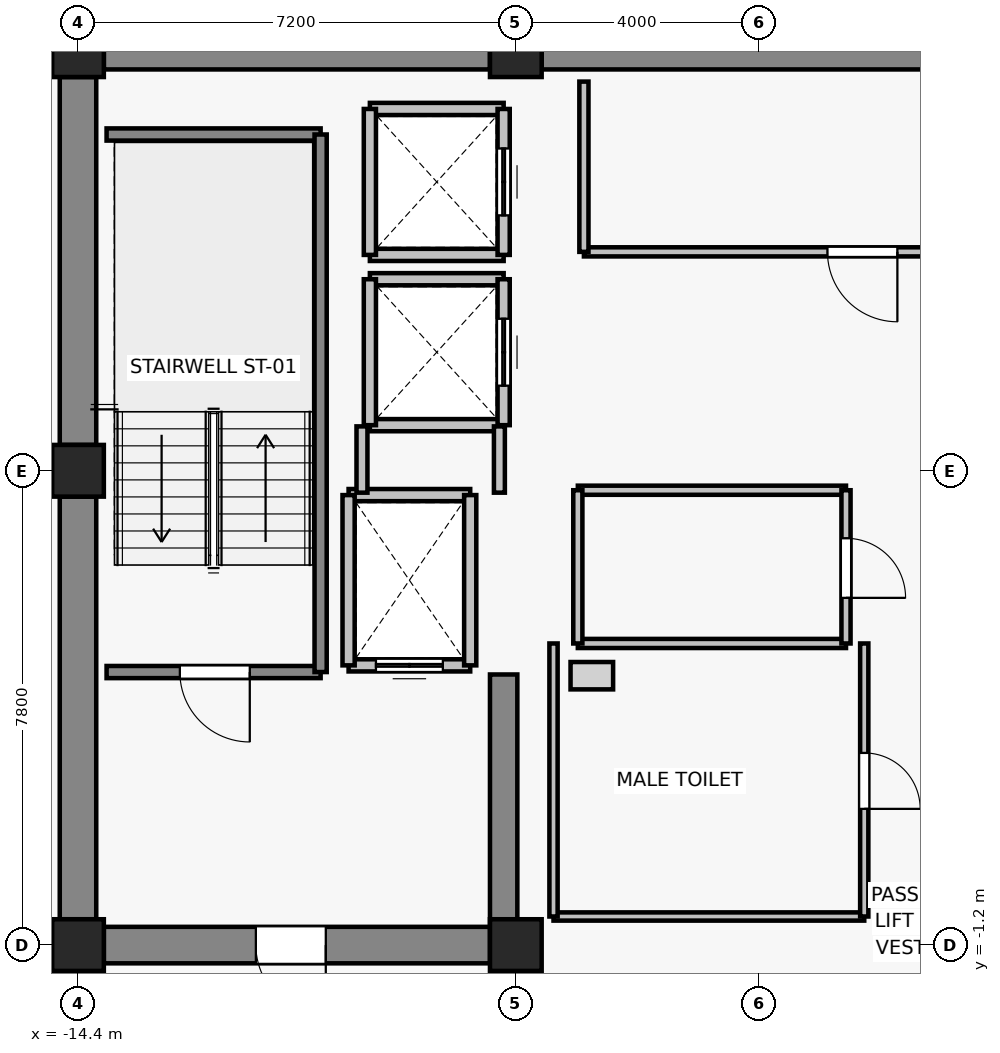
"""IFC4 building model, lengths in metres.
Left out: names, types, materials, properties, quantities, classifications, styles, units other than length and angle.
Written with IfcOpenShell. Run it as: python <this file> out.ifc"""

import sys

from ifc_helpers import new_model, si_unit, direction, frame, frame_2d, origin, origin_2d, place, context, subcontext, project, spatial, rectangle, extrude, source, transform, mapped, element, fill, save


model = new_model("IFC4")
c1 = context("Model", 3, precision=1e-05, world=origin(), true_north=direction((0.0, 1.0)))
c2 = subcontext(c1, "Body", "Model", "MODEL_VIEW")
j1 = project(units=[si_unit("LENGTHUNIT", "METRE"), si_unit("PLANEANGLEUNIT", "RADIAN")], contexts=[c1])
p1 = place(None, origin())
s1 = spatial("IfcSite", under=j1, at=p1, CompositionType="ELEMENT")
p2 = place(p1, origin())
s2 = spatial("IfcBuilding", under=s1, at=p2, CompositionType="ELEMENT")
p3 = place(p2, frame((0.0, 0.0, 238.6)))
s3 = spatial("IfcBuildingStorey", under=s2, at=p3, CompositionType="ELEMENT", Elevation=238.6)
for number, where, z_axis, x_axis in (
    (1, (-14.4, -1.2, 0.0), (0.0, 0.0, 1.0), (1.0, 0.0, 0.0)),
    (2, (-7.2, -1.2, 0.0), (0.0, 0.0, 1.0), (1.0, 0.0, 0.0)),
    (3, (-14.4, 6.6, 0.0), (0.0, 0.0, 1.0), (1.0, 0.0, 0.0)),
    (4, (-14.4, 13.5, 0.0), (0.0, 0.0, 1.0), (1.0, 0.0, 0.0)),
    (5, (-7.2, 13.5, 0.0), (0.0, 0.0, 1.0), (1.0, 0.0, 0.0)),
):
    element("IfcColumn", number, at=place(p3, frame(where, z_axis=z_axis, x_axis=x_axis)), inside=s3, PredefinedType="COLUMN", context=c2, shape_type="SweptSolid", body=[
        extrude(rectangle(XDim=0.85, YDim=0.85, at=origin_2d()), origin(), (0.0, 0.0, 1.0), 3.3),
    ])
p4 = place(p3, frame((-13.975, 13.5, 0.0), z_axis=(0.0, 0.0, 1.0), x_axis=(1.0, 0.0, 0.0)))
e6 = element("IfcWall", 6, at=p4, inside=s3, PredefinedType="SHEAR", context=c2, shape_type="SweptSolid", body=[
    extrude(rectangle(XDim=6.35, YDim=0.6, at=frame_2d((3.175, 0.0))), origin(), (0.0, 0.0, 1.0), 3.075),
])
p5 = place(p3, frame((-6.775, 13.5, 0.0), z_axis=(0.0, 0.0, 1.0), x_axis=(1.0, 0.0, 0.0)))
e7 = element("IfcWall", 7, at=p5, inside=s3, PredefinedType="SHEAR", context=c2, shape_type="SweptSolid", body=[
    extrude(rectangle(XDim=13.55, YDim=0.6, at=frame_2d((6.775, 0.0))), origin(), (0.0, 0.0, 1.0), 3.075),
])
p6 = place(p3, frame((-14.4, -0.775, 0.0), z_axis=(0.0, 0.0, 1.0), x_axis=(0.0, 1.0, 0.0)))
e8 = element("IfcWall", 8, at=p6, inside=s3, PredefinedType="SHEAR", context=c2, shape_type="SweptSolid", body=[
    extrude(rectangle(XDim=6.95, YDim=0.6, at=frame_2d((3.475, 0.0))), origin(), (0.0, 0.0, 1.0), 3.075),
])
p7 = place(p3, frame((-14.4, 7.025, 0.0), z_axis=(0.0, 0.0, 1.0), x_axis=(0.0, 1.0, 0.0)))
e9 = element("IfcWall", 9, at=p7, inside=s3, PredefinedType="SHEAR", context=c2, shape_type="SweptSolid", body=[
    extrude(rectangle(XDim=6.05, YDim=0.6, at=frame_2d((3.025, 0.0))), origin(), (0.0, 0.0, 1.0), 3.075),
])
p8 = place(p3, frame((-7.625, -1.2, 0.0), z_axis=(0.0, 0.0, 1.0), x_axis=(-1.0, 0.0, 0.0)))
e10 = element("IfcWall", 10, at=p8, inside=s3, PredefinedType="SHEAR", context=c2, shape_type="SweptSolid", body=[
    extrude(rectangle(XDim=6.35, YDim=0.6, at=frame_2d((3.175, 0.0))), origin(), (0.0, 0.0, 1.0), 3.075),
])
p9 = place(p8, frame((2.7, 0.0, 0.0)))
e11 = element("IfcOpeningElement", 11, at=p9, cuts=e10, PredefinedType="OPENING", context=c2, shape_type="SweptSolid", body=[
    extrude(rectangle(XDim=1.15, YDim=2.15, at=frame_2d((0.575, 1.075))), frame((0.0, 0.31, 0.0), z_axis=(0.0, -1.0, 0.0), x_axis=(1.0, 0.0, 0.0)), (0.0, 0.0, 1.0), 0.62),
])
p10 = place(p3, frame((-7.4, -0.9, 0.0), z_axis=(0.0, 0.0, 1.0), x_axis=(0.0, 1.0, 0.0)))
e12 = element("IfcWall", 12, at=p10, inside=s3, PredefinedType="SHEAR", context=c2, shape_type="SweptSolid", body=[
    extrude(rectangle(XDim=4.15, YDim=0.45, at=frame_2d((2.075, 0.0))), origin(), (0.0, 0.0, 1.0), 3.075),
])
p11 = place(p3, frame((-7.95, 3.4, 0.0), z_axis=(0.0, 0.0, 1.0), x_axis=(-1.0, 0.0, 0.0)))
e13 = element("IfcWall", 13, at=p11, inside=s3, PredefinedType="SOLIDWALL", context=c2, shape_type="SweptSolid", body=[
    extrude(rectangle(XDim=2.0, YDim=0.2, at=frame_2d((1.0, 0.0))), origin(), (0.0, 0.0, 1.0), 3.075),
])
p12 = place(p11, frame((0.45, 0.0, 0.0)))
e14 = element("IfcOpeningElement", 14, at=p12, cuts=e13, PredefinedType="OPENING", context=c2, shape_type="SweptSolid", body=[
    extrude(rectangle(XDim=1.1, YDim=2.2, at=frame_2d((0.55, 1.1))), frame((0.0, 0.11, 0.0), z_axis=(0.0, -1.0, 0.0), x_axis=(1.0, 0.0, 0.0)), (0.0, 0.0, 1.0), 0.22),
])
p13 = place(p3, frame((-9.95, 6.2, 0.0), z_axis=(0.0, 0.0, 1.0), x_axis=(1.0, 0.0, 0.0)))
e15 = element("IfcWall", 15, at=p13, inside=s3, PredefinedType="SOLIDWALL", context=c2, shape_type="SweptSolid", body=[
    extrude(rectangle(XDim=2.0, YDim=0.2, at=frame_2d((1.0, 0.0))), origin(), (0.0, 0.0, 1.0), 3.075),
])
for number, where, z_axis, x_axis in (
    (16, (-9.95, 3.4, 0.0), (0.0, 0.0, 1.0), (0.0, 1.0, 0.0)),
    (17, (-7.95, 6.2, 0.0), (0.0, 0.0, 1.0), (0.0, -1.0, 0.0)),
):
    element("IfcWall", number, at=place(p3, frame(where, z_axis=z_axis, x_axis=x_axis)), inside=s3, PredefinedType="SOLIDWALL", context=c2, shape_type="SweptSolid", body=[
        extrude(rectangle(XDim=2.8, YDim=0.2, at=frame_2d((1.4, 0.0))), origin(), (0.0, 0.0, 1.0), 3.075),
    ])
for number, where, z_axis, x_axis in (
    (18, (-7.4, 7.35, 0.0), (0.0, 0.0, 1.0), (-1.0, 0.0, 0.0)),
    (19, (-9.6, 9.75, 0.0), (0.0, 0.0, 1.0), (1.0, 0.0, 0.0)),
):
    element("IfcWall", number, at=place(p3, frame(where, z_axis=z_axis, x_axis=x_axis)), inside=s3, PredefinedType="SOLIDWALL", context=c2, shape_type="SweptSolid", body=[
        extrude(rectangle(XDim=2.2, YDim=0.2, at=frame_2d((1.1, 0.0))), origin(), (0.0, 0.0, 1.0), 2.615),
    ])
p14 = place(p3, frame((-9.6, 7.35, 0.0), z_axis=(0.0, 0.0, 1.0), x_axis=(0.0, 1.0, 0.0)))
e20 = element("IfcWall", 20, at=p14, inside=s3, PredefinedType="SOLIDWALL", context=c2, shape_type="SweptSolid", body=[
    extrude(rectangle(XDim=2.4, YDim=0.2, at=frame_2d((1.2, 0.0))), origin(), (0.0, 0.0, 1.0), 3.075),
])
p15 = place(p3, frame((-7.4, 9.75, 0.0), z_axis=(0.0, 0.0, 1.0), x_axis=(0.0, -1.0, 0.0)))
e21 = element("IfcWall", 21, at=p15, inside=s3, PredefinedType="SOLIDWALL", context=c2, shape_type="SweptSolid", body=[
    extrude(rectangle(XDim=2.4, YDim=0.2, at=frame_2d((1.2, 0.0))), origin(), (0.0, 0.0, 1.0), 2.615),
])
p16 = place(p15, frame((0.65, 0.0, 0.0)))
e22 = element("IfcOpeningElement", 22, at=p16, cuts=e21, PredefinedType="OPENING", context=c2, shape_type="SweptSolid", body=[
    extrude(rectangle(XDim=1.1, YDim=2.2, at=frame_2d((0.55, 1.1))), frame((0.0, 0.11, 0.0), z_axis=(0.0, -1.0, 0.0), x_axis=(1.0, 0.0, 0.0)), (0.0, 0.0, 1.0), 0.22),
])
for number, where, z_axis, x_axis in (
    (23, (-7.4, 10.15, 0.0), (0.0, 0.0, 1.0), (-1.0, 0.0, 0.0)),
    (24, (-9.6, 12.55, 0.0), (0.0, 0.0, 1.0), (1.0, 0.0, 0.0)),
):
    element("IfcWall", number, at=place(p3, frame(where, z_axis=z_axis, x_axis=x_axis)), inside=s3, PredefinedType="SOLIDWALL", context=c2, shape_type="SweptSolid", body=[
        extrude(rectangle(XDim=2.2, YDim=0.2, at=frame_2d((1.1, 0.0))), origin(), (0.0, 0.0, 1.0), 2.615),
    ])
p17 = place(p3, frame((-9.6, 10.15, 0.0), z_axis=(0.0, 0.0, 1.0), x_axis=(0.0, 1.0, 0.0)))
e25 = element("IfcWall", 25, at=p17, inside=s3, PredefinedType="SOLIDWALL", context=c2, shape_type="SweptSolid", body=[
    extrude(rectangle(XDim=2.4, YDim=0.2, at=frame_2d((1.2, 0.0))), origin(), (0.0, 0.0, 1.0), 3.075),
])
p18 = place(p3, frame((-7.4, 12.55, 0.0), z_axis=(0.0, 0.0, 1.0), x_axis=(0.0, -1.0, 0.0)))
e26 = element("IfcWall", 26, at=p18, inside=s3, PredefinedType="SOLIDWALL", context=c2, shape_type="SweptSolid", body=[
    extrude(rectangle(XDim=2.4, YDim=0.2, at=frame_2d((1.2, 0.0))), origin(), (0.0, 0.0, 1.0), 2.615),
])
p19 = place(p18, frame((0.65, 0.0, 0.0)))
e27 = element("IfcOpeningElement", 27, at=p19, cuts=e26, PredefinedType="OPENING", context=c2, shape_type="SweptSolid", body=[
    extrude(rectangle(XDim=1.1, YDim=2.2, at=frame_2d((0.55, 1.1))), frame((0.0, 0.11, 0.0), z_axis=(0.0, -1.0, 0.0), x_axis=(1.0, 0.0, 0.0)), (0.0, 0.0, 1.0), 0.22),
])
p20 = place(p3, frame((-10.41, 3.29, 0.0), z_axis=(0.0, 0.0, 1.0), x_axis=(-1.0, 0.0, 0.0)))
e28 = element("IfcWall", 28, at=p20, inside=s3, PredefinedType="SOLIDWALL", context=c2, shape_type="SweptSolid", body=[
    extrude(rectangle(XDim=3.52, YDim=0.2, at=frame_2d((1.76, 0.0))), origin(), (0.0, 0.0, 1.0), 3.075),
])
p21 = place(p20, frame((1.165, 0.0, 0.0)))
e29 = element("IfcOpeningElement", 29, at=p21, cuts=e28, PredefinedType="OPENING", context=c2, shape_type="SweptSolid", body=[
    extrude(rectangle(XDim=1.15, YDim=2.15, at=frame_2d((0.575, 1.075))), frame((0.0, 0.11, 0.0), z_axis=(0.0, -1.0, 0.0), x_axis=(1.0, 0.0, 0.0)), (0.0, 0.0, 1.0), 0.22),
])
p22 = place(p3, frame((-13.93, 12.13, 0.0), z_axis=(0.0, 0.0, 1.0), x_axis=(1.0, 0.0, 0.0)))
e30 = element("IfcWall", 30, at=p22, inside=s3, PredefinedType="SOLIDWALL", context=c2, shape_type="SweptSolid", body=[
    extrude(rectangle(XDim=3.52, YDim=0.2, at=frame_2d((1.76, 0.0))), origin(), (0.0, 0.0, 1.0), 3.075),
])
p23 = place(p3, frame((-10.41, 12.13, 0.0), z_axis=(0.0, 0.0, 1.0), x_axis=(0.0, -1.0, 0.0)))
e31 = element("IfcWall", 31, at=p23, inside=s3, PredefinedType="SOLIDWALL", context=c2, shape_type="SweptSolid", body=[
    extrude(rectangle(XDim=8.84, YDim=0.2, at=frame_2d((4.42, 0.0))), origin(), (0.0, 0.0, 1.0), 3.075),
])
p24 = place(p3, frame((-9.73, 6.24, 0.0), z_axis=(0.0, 0.0, 1.0), x_axis=(0.0, 1.0, 0.0)))
e32 = element("IfcWall", 32, at=p24, inside=s3, PredefinedType="PARTITIONING", context=c2, shape_type="SweptSolid", body=[
    extrude(rectangle(XDim=1.09, YDim=0.18, at=frame_2d((0.545, 0.0))), origin(), (0.0, 0.0, 1.0), 3.075),
])
p25 = place(p3, frame((-7.47, 7.33, 0.0), z_axis=(0.0, 0.0, 1.0), x_axis=(0.0, -1.0, 0.0)))
e33 = element("IfcWall", 33, at=p25, inside=s3, PredefinedType="PARTITIONING", context=c2, shape_type="SweptSolid", body=[
    extrude(rectangle(XDim=1.09, YDim=0.18, at=frame_2d((0.545, 0.0))), origin(), (0.0, 0.0, 1.0), 2.615),
])
p26 = place(p3, frame((6.08, 10.2, 0.0), z_axis=(0.0, 0.0, 1.0), x_axis=(-1.0, 0.0, 0.0)))
e34 = element("IfcWall", 34, at=p26, inside=s3, PredefinedType="PARTITIONING", context=c2, shape_type="SweptSolid", body=[
    extrude(rectangle(XDim=12.16, YDim=0.15, at=frame_2d((6.08, 0.0))), origin(), (0.0, 0.0, 1.0), 3.075),
])
p27 = place(p26, frame((7.005, 0.0, 0.0)))
e35 = element("IfcOpeningElement", 35, at=p27, cuts=e34, PredefinedType="OPENING", context=c2, shape_type="SweptSolid", body=[
    extrude(rectangle(XDim=1.15, YDim=2.15, at=frame_2d((0.575, 1.075))), frame((0.0, 0.085, 0.0), z_axis=(0.0, -1.0, 0.0), x_axis=(1.0, 0.0, 0.0)), (0.0, 0.0, 1.0), 0.17),
])
p28 = place(p3, frame((-6.08, 10.2, 0.0), z_axis=(0.0, 0.0, 1.0), x_axis=(0.0, 1.0, 0.0)))
e36 = element("IfcWall", 36, at=p28, inside=s3, PredefinedType="PARTITIONING", context=c2, shape_type="SweptSolid", body=[
    extrude(rectangle(XDim=2.8, YDim=0.15, at=frame_2d((1.4, 0.0))), origin(), (0.0, 0.0, 1.0), 3.075),
])
for number, where, z_axis, x_axis in (
    (37, (-1.77, 3.76, 0.0), (0.0, 0.0, 1.0), (-1.0, 0.0, 0.0)),
    (38, (-6.18, 6.28, 0.0), (0.0, 0.0, 1.0), (1.0, 0.0, 0.0)),
):
    element("IfcWall", number, at=place(p3, frame(where, z_axis=z_axis, x_axis=x_axis)), inside=s3, PredefinedType="PARTITIONING", context=c2, shape_type="SweptSolid", body=[
        extrude(rectangle(XDim=4.41, YDim=0.15, at=frame_2d((2.205, 0.0))), origin(), (0.0, 0.0, 1.0), 3.075),
    ])
p29 = place(p3, frame((-6.18, 3.76, 0.0), z_axis=(0.0, 0.0, 1.0), x_axis=(0.0, 1.0, 0.0)))
e39 = element("IfcWall", 39, at=p29, inside=s3, PredefinedType="PARTITIONING", context=c2, shape_type="SweptSolid", body=[
    extrude(rectangle(XDim=2.52, YDim=0.15, at=frame_2d((1.26, 0.0))), origin(), (0.0, 0.0, 1.0), 3.075),
])
p30 = place(p3, frame((-1.77, 6.28, 0.0), z_axis=(0.0, 0.0, 1.0), x_axis=(0.0, -1.0, 0.0)))
e40 = element("IfcWall", 40, at=p30, inside=s3, PredefinedType="PARTITIONING", context=c2, shape_type="SweptSolid", body=[
    extrude(rectangle(XDim=2.52, YDim=0.15, at=frame_2d((1.26, 0.0))), origin(), (0.0, 0.0, 1.0), 3.075),
])
p31 = place(p30, frame((0.79, 0.0, 0.0)))
e41 = element("IfcOpeningElement", 41, at=p31, cuts=e40, PredefinedType="OPENING", context=c2, shape_type="SweptSolid", body=[
    extrude(rectangle(XDim=0.98, YDim=2.15, at=frame_2d((0.49, 1.075))), frame((0.0, 0.085, 0.0), z_axis=(0.0, -1.0, 0.0), x_axis=(1.0, 0.0, 0.0)), (0.0, 0.0, 1.0), 0.17),
])
p32 = place(p3, frame((-1.47, -0.73, 0.0), z_axis=(0.0, 0.0, 1.0), x_axis=(-1.0, 0.0, 0.0)))
e42 = element("IfcWall", 42, at=p32, inside=s3, PredefinedType="PARTITIONING", context=c2, shape_type="SweptSolid", body=[
    extrude(rectangle(XDim=5.11, YDim=0.135, at=frame_2d((2.555, 0.0))), origin(), (0.0, 0.0, 1.0), 3.075),
])
p33 = place(p3, frame((-6.58, -0.73, 0.0), z_axis=(0.0, 0.0, 1.0), x_axis=(0.0, 1.0, 0.0)))
e43 = element("IfcWall", 43, at=p33, inside=s3, PredefinedType="PARTITIONING", context=c2, shape_type="SweptSolid", body=[
    extrude(rectangle(XDim=4.49, YDim=0.135, at=frame_2d((2.245, 0.0))), origin(), (0.0, 0.0, 1.0), 3.075),
])
p34 = place(p3, frame((-1.47, 3.76, 0.0), z_axis=(0.0, 0.0, 1.0), x_axis=(0.0, -1.0, 0.0)))
e44 = element("IfcWall", 44, at=p34, inside=s3, PredefinedType="PARTITIONING", context=c2, shape_type="SweptSolid", body=[
    extrude(rectangle(XDim=4.49, YDim=0.135, at=frame_2d((2.245, 0.0))), origin(), (0.0, 0.0, 1.0), 3.075),
])
p35 = place(p34, frame((1.8, 0.0, 0.0)))
e45 = element("IfcOpeningElement", 45, at=p35, cuts=e44, PredefinedType="OPENING", context=c2, shape_type="SweptSolid", body=[
    extrude(rectangle(XDim=0.92, YDim=2.1, at=frame_2d((0.46, 1.05))), frame((0.0, 0.077, 0.0), z_axis=(0.0, -1.0, 0.0), x_axis=(1.0, 0.0, 0.0)), (0.0, 0.0, 1.0), 0.155),
])
m1 = source(origin(), c2, "Body", "SweptSolid", [
    extrude(rectangle(XDim=1.1, YDim=2.2, at=frame_2d((0.55, 1.1))), frame((0.0, 0.025, 0.0), z_axis=(0.0, -1.0, 0.0), x_axis=(1.0, 0.0, 0.0)), (0.0, 0.0, 1.0), 0.05),
])
p36 = place(p12, origin())
e46 = element("IfcDoor", 46, at=p36, inside=s3, OperationType="DOUBLE_DOOR_SLIDING", PredefinedType="DOOR", context=c2, shape_type="MappedRepresentation", body=[
    mapped(m1, transform((0.0, 0.0, 0.0), x_axis=(1.0, 0.0, 0.0), y_axis=(0.0, 1.0, 0.0), z_axis=(0.0, 0.0, 1.0), scale=1.0)),
])
fill(e14, e46)
p37 = place(p16, origin())
e47 = element("IfcDoor", 47, at=p37, inside=s3, OperationType="DOUBLE_DOOR_SLIDING", PredefinedType="DOOR", context=c2, shape_type="MappedRepresentation", body=[
    mapped(m1, transform((0.0, 0.0, 0.0), x_axis=(1.0, 0.0, 0.0), y_axis=(0.0, 1.0, 0.0), z_axis=(0.0, 0.0, 1.0), scale=1.0)),
])
fill(e22, e47)
p38 = place(p19, origin())
e48 = element("IfcDoor", 48, at=p38, inside=s3, OperationType="DOUBLE_DOOR_SLIDING", PredefinedType="DOOR", context=c2, shape_type="MappedRepresentation", body=[
    mapped(m1, transform((0.0, 0.0, 0.0), x_axis=(1.0, 0.0, 0.0), y_axis=(0.0, 1.0, 0.0), z_axis=(0.0, 0.0, 1.0), scale=1.0)),
])
fill(e27, e48)
m2 = source(origin(), c2, "Body", "SweptSolid", [
    extrude(rectangle(XDim=1.15, YDim=2.15, at=frame_2d((0.575, 1.075))), frame((0.0, 0.025, 0.0), z_axis=(0.0, -1.0, 0.0), x_axis=(1.0, 0.0, 0.0)), (0.0, 0.0, 1.0), 0.05),
])
p39 = place(p21, origin())
e49 = element("IfcDoor", 49, at=p39, inside=s3, OperationType="SINGLE_SWING_LEFT", PredefinedType="DOOR", context=c2, shape_type="MappedRepresentation", body=[
    mapped(m2, transform((0.0, 0.0, 0.0), x_axis=(1.0, 0.0, 0.0), y_axis=(0.0, 1.0, 0.0), z_axis=(0.0, 0.0, 1.0), scale=1.0)),
])
fill(e29, e49)
p40 = place(p9, origin())
e50 = element("IfcDoor", 50, at=p40, inside=s3, OperationType="SINGLE_SWING_LEFT", PredefinedType="DOOR", context=c2, shape_type="MappedRepresentation", body=[
    mapped(m2, transform((0.0, 0.0, 0.0), x_axis=(1.0, 0.0, 0.0), y_axis=(0.0, 1.0, 0.0), z_axis=(0.0, 0.0, 1.0), scale=1.0)),
])
fill(e11, e50)
p41 = place(p27, origin())
e51 = element("IfcDoor", 51, at=p41, inside=s3, OperationType="SINGLE_SWING_LEFT", PredefinedType="DOOR", context=c2, shape_type="MappedRepresentation", body=[
    mapped(m2, transform((0.0, 0.0, 0.0), x_axis=(1.0, 0.0, 0.0), y_axis=(0.0, 1.0, 0.0), z_axis=(0.0, 0.0, 1.0), scale=1.0)),
])
fill(e35, e51)
m3 = source(origin(), c2, "Body", "SweptSolid", [
    extrude(rectangle(XDim=0.98, YDim=2.15, at=frame_2d((0.49, 1.075))), frame((0.0, 0.025, 0.0), z_axis=(0.0, -1.0, 0.0), x_axis=(1.0, 0.0, 0.0)), (0.0, 0.0, 1.0), 0.05),
])
p42 = place(p31, origin())
e52 = element("IfcDoor", 52, at=p42, inside=s3, OperationType="SINGLE_SWING_RIGHT", PredefinedType="DOOR", context=c2, shape_type="MappedRepresentation", body=[
    mapped(m3, transform((0.0, 0.0, 0.0), x_axis=(1.0, 0.0, 0.0), y_axis=(0.0, 1.0, 0.0), z_axis=(0.0, 0.0, 1.0), scale=1.0)),
])
fill(e41, e52)
m4 = source(origin(), c2, "Body", "SweptSolid", [
    extrude(rectangle(XDim=0.92, YDim=2.1, at=frame_2d((0.46, 1.05))), frame((0.0, 0.025, 0.0), z_axis=(0.0, -1.0, 0.0), x_axis=(1.0, 0.0, 0.0)), (0.0, 0.0, 1.0), 0.05),
])
p43 = place(p35, origin())
e53 = element("IfcDoor", 53, at=p43, inside=s3, OperationType="SINGLE_SWING_RIGHT", PredefinedType="DOOR", context=c2, shape_type="MappedRepresentation", body=[
    mapped(m4, transform((0.0, 0.0, 0.0), x_axis=(1.0, 0.0, 0.0), y_axis=(0.0, 1.0, 0.0), z_axis=(0.0, 0.0, 1.0), scale=1.0)),
])
fill(e45, e53)
save(model, sys.argv[1])
